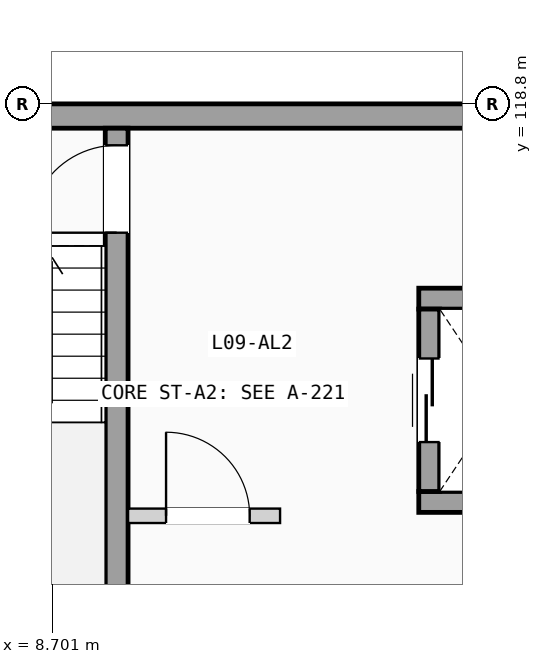
"""IFC4 building model, lengths in metres.
Left out: names, types, materials, properties, quantities, classifications, styles, units other than length and angle.
Written with IfcOpenShell. Run it as: python <this file> out.ifc"""

import sys

from ifc_helpers import new_model, si_unit, direction, frame, frame_2d, origin, place, context, subcontext, project, spatial, rectangle, extrude, element, fill, save


model = new_model("IFC4")
c1 = context("Model", 3, precision=1e-05, world=origin(), true_north=direction((0.0, 1.0)))
c2 = subcontext(c1, "Body", "Model", "MODEL_VIEW")
j1 = project(units=[si_unit("LENGTHUNIT", "METRE"), si_unit("PLANEANGLEUNIT", "RADIAN")], contexts=[c1])
p1 = place(None, origin())
s1 = spatial("IfcSite", under=j1, at=p1, CompositionType="ELEMENT")
p2 = place(p1, origin())
s2 = spatial("IfcBuilding", under=s1, at=p2, CompositionType="ELEMENT")
p3 = place(p2, frame((0.0, 0.0, 30.975)))
s3 = spatial("IfcBuildingStorey", under=s2, at=p3, CompositionType="ELEMENT", Elevation=30.975)
p4 = place(p3, frame((0.0, 118.64, 0.0), z_axis=(0.0, 0.0, 1.0), x_axis=(1.0, 0.0, 0.0)))
e1 = element("IfcWall", 1, at=p4, inside=s3, PredefinedType="SOLIDWALL", context=c2, shape_type="SweptSolid", body=[
    extrude(rectangle(XDim=21.6, YDim=0.32, at=frame_2d((10.8, 0.0))), origin(), (0.0, 0.0, 1.0), 2.9),
])
p5 = place(p3, frame((9.55, 111.48, 0.0), z_axis=(0.0, 0.0, 1.0), x_axis=(0.0, 1.0, 0.0)))
e2 = element("IfcWall", 2, at=p5, inside=s3, PredefinedType="SHEAR", context=c2, shape_type="SweptSolid", body=[
    extrude(rectangle(XDim=7.0, YDim=0.3, at=frame_2d((3.5, 0.0))), origin(), (0.0, 0.0, 1.0), 2.9),
])
p6 = place(p5, frame((5.625, 0.0, 0.0)))
e3 = element("IfcOpeningElement", 3, at=p6, cuts=e2, PredefinedType="OPENING", context=c2, shape_type="SweptSolid", body=[
    extrude(rectangle(XDim=1.15, YDim=2.12, at=frame_2d((0.575, 1.06))), frame((0.0, 0.16, 0.0), z_axis=(0.0, -1.0, 0.0), x_axis=(1.0, 0.0, 0.0)), (0.0, 0.0, 1.0), 0.32),
])
for number, where, z_axis, x_axis in (
    (4, (13.525, 113.562, 0.0), (0.0, 0.0, 1.0), (1.0, 0.0, 0.0)),
    (5, (13.525, 116.238, 0.0), (0.0, 0.0, 1.0), (1.0, 0.0, 0.0)),
):
    element("IfcWall", number, at=place(p3, frame(where, z_axis=z_axis, x_axis=x_axis)), inside=s3, PredefinedType="SHEAR", context=c2, shape_type="SweptSolid", body=[
        extrude(rectangle(XDim=2.15, YDim=0.275, at=frame_2d((1.075, 0.0))), origin(), (0.0, 0.0, 1.0), 2.9),
    ])
p7 = place(p3, frame((13.663, 113.7, 0.0), z_axis=(0.0, 0.0, 1.0), x_axis=(0.0, 1.0, 0.0)))
e6 = element("IfcWall", 6, at=p7, inside=s3, PredefinedType="SHEAR", context=c2, shape_type="SweptSolid", body=[
    extrude(rectangle(XDim=2.4, YDim=0.275, at=frame_2d((1.2, 0.0))), origin(), (0.0, 0.0, 1.0), 2.9),
])
p8 = place(p7, frame((0.65, 0.0, 0.0)))
e7 = element("IfcOpeningElement", 7, at=p8, cuts=e6, PredefinedType="OPENING", context=c2, shape_type="SweptSolid", body=[
    extrude(rectangle(XDim=1.1, YDim=2.15, at=frame_2d((0.55, 1.075))), frame((0.0, 0.147, 0.0), z_axis=(0.0, -1.0, 0.0), x_axis=(1.0, 0.0, 0.0)), (0.0, 0.0, 1.0), 0.295),
])
p9 = place(p3, frame((9.7, 113.38, 0.0), z_axis=(0.0, 0.0, 1.0), x_axis=(1.0, 0.0, 0.0)))
e8 = element("IfcWall", 8, at=p9, inside=s3, PredefinedType="PARTITIONING", context=c2, shape_type="SweptSolid", body=[
    extrude(rectangle(XDim=2.0, YDim=0.19, at=frame_2d((1.0, 0.0))), origin(), (0.0, 0.0, 1.0), 2.87),
])
p10 = place(p9, frame((0.5, 0.0, 0.0)))
e9 = element("IfcOpeningElement", 9, at=p10, cuts=e8, PredefinedType="OPENING", context=c2, shape_type="SweptSolid", body=[
    extrude(rectangle(XDim=1.1, YDim=2.12, at=frame_2d((0.55, 1.06))), frame((0.0, 0.105, 0.0), z_axis=(0.0, -1.0, 0.0), x_axis=(1.0, 0.0, 0.0)), (0.0, 0.0, 1.0), 0.21),
])
p11 = place(p6, origin())
e10 = element("IfcDoor", 10, at=p11, inside=s3, OperationType="SINGLE_SWING_LEFT", PredefinedType="DOOR", context=c2, shape_type="SweptSolid", body=[
    extrude(rectangle(XDim=1.15, YDim=2.12, at=frame_2d((0.575, 1.06))), frame((0.0, 0.025, 0.0), z_axis=(0.0, -1.0, 0.0), x_axis=(1.0, 0.0, 0.0)), (0.0, 0.0, 1.0), 0.05),
])
fill(e3, e10)
p12 = place(p8, origin())
e11 = element("IfcDoor", 11, at=p12, inside=s3, OperationType="SLIDING_TO_LEFT", PredefinedType="DOOR", context=c2, shape_type="SweptSolid", body=[
    extrude(rectangle(XDim=1.1, YDim=2.15, at=frame_2d((0.55, 1.075))), frame((0.0, 0.025, 0.0), z_axis=(0.0, -1.0, 0.0), x_axis=(1.0, 0.0, 0.0)), (0.0, 0.0, 1.0), 0.05),
])
fill(e7, e11)
p13 = place(p10, origin())
e12 = element("IfcDoor", 12, at=p13, inside=s3, OperationType="SINGLE_SWING_LEFT", PredefinedType="DOOR", context=c2, shape_type="SweptSolid", body=[
    extrude(rectangle(XDim=1.1, YDim=2.12, at=frame_2d((0.55, 1.06))), frame((0.0, 0.025, 0.0), z_axis=(0.0, -1.0, 0.0), x_axis=(1.0, 0.0, 0.0)), (0.0, 0.0, 1.0), 0.05),
])
fill(e9, e12)
save(model, sys.argv[1])
